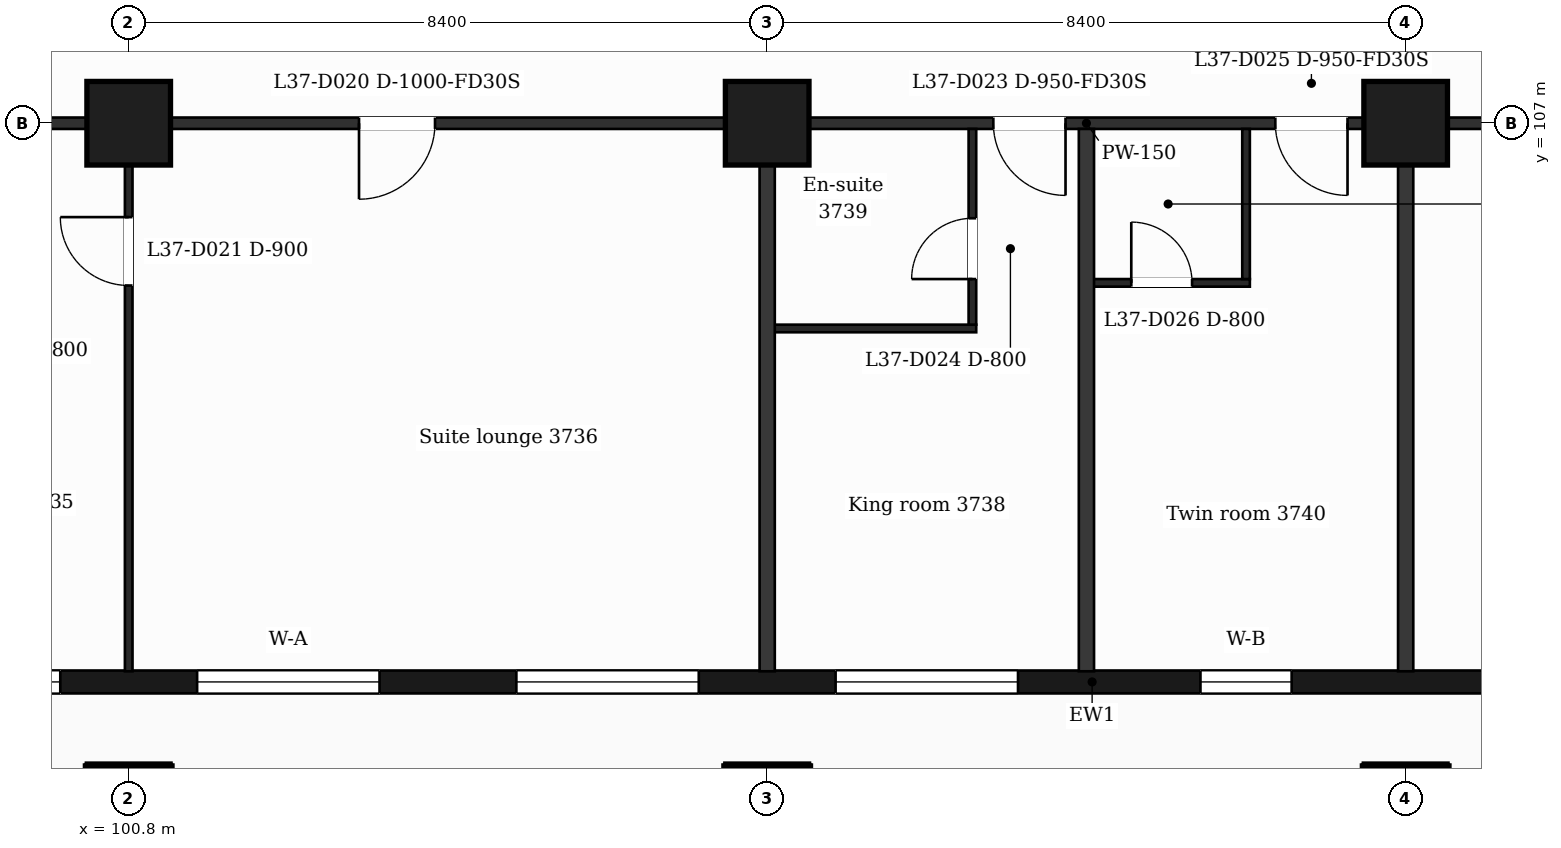
"""IFC4 building model, lengths in metres.
Left out: names, types, materials, properties, quantities, classifications, styles, units other than length and angle.
Written with IfcOpenShell. Run it as: python <this file> out.ifc"""

import sys

from ifc_helpers import new_model, si_unit, direction, frame, frame_2d, origin, origin_2d, place, context, subcontext, project, spatial, rectangle, extrude, element, fill, save


model = new_model("IFC4")
c1 = context("Model", 3, precision=1e-05, world=origin(), true_north=direction((0.0, 1.0)))
c2 = subcontext(c1, "Body", "Model", "MODEL_VIEW")
j1 = project(units=[si_unit("LENGTHUNIT", "METRE"), si_unit("PLANEANGLEUNIT", "RADIAN")], contexts=[c1])
p1 = place(None, origin())
s1 = spatial("IfcSite", under=j1, at=p1, CompositionType="ELEMENT")
p2 = place(p1, origin())
s2 = spatial("IfcBuilding", under=s1, at=p2, CompositionType="ELEMENT")
p3 = place(p2, frame((0.0, 0.0, 158.9)))
s3 = spatial("IfcBuildingStorey", under=s2, at=p3, CompositionType="ELEMENT", Elevation=158.9)
for number, where, z_axis, x_axis in (
    (1, (100.8, 98.0, 0.0), (0.0, 0.0, 1.0), (1.0, 0.0, 0.0)),
    (2, (109.2, 98.0, 0.0), (0.0, 0.0, 1.0), (1.0, 0.0, 0.0)),
    (3, (117.6, 98.0, 0.0), (0.0, 0.0, 1.0), (1.0, 0.0, 0.0)),
    (4, (100.8, 107.0, 0.0), (0.0, 0.0, 1.0), (1.0, 0.0, 0.0)),
    (5, (109.2, 107.0, 0.0), (0.0, 0.0, 1.0), (1.0, 0.0, 0.0)),
    (6, (117.6, 107.0, 0.0), (0.0, 0.0, 1.0), (1.0, 0.0, 0.0)),
):
    element("IfcColumn", number, at=place(p3, frame(where, z_axis=z_axis, x_axis=x_axis)), inside=s3, PredefinedType="COLUMN", context=c2, shape_type="SweptSolid", body=[
        extrude(rectangle(XDim=1.1, YDim=1.1, at=origin_2d()), origin(), (0.0, 0.0, 1.0), 3.7),
    ])
p4 = place(p3, frame((89.85, 99.65, 0.0), z_axis=(0.0, 0.0, 1.0), x_axis=(1.0, 0.0, 0.0)))
e7 = element("IfcWall", 7, at=p4, inside=s3, PredefinedType="SOLIDWALL", context=c2, shape_type="SweptSolid", body=[
    extrude(rectangle(XDim=47.25, YDim=0.3, at=frame_2d((23.625, 0.0))), origin(), (0.0, 0.0, 1.0), 3.38),
])
p5 = place(p4, frame((0.725, 0.0, 0.9)))
e8 = element("IfcOpeningElement", 8, at=p5, cuts=e7, PredefinedType="OPENING", context=c2, shape_type="SweptSolid", body=[
    extrude(rectangle(XDim=1.2, YDim=2.1, at=frame_2d((0.6, 1.05))), frame((0.0, 0.16, 0.0), z_axis=(0.0, -1.0, 0.0), x_axis=(1.0, 0.0, 0.0)), (0.0, 0.0, 1.0), 0.32),
])
p6 = place(p4, frame((3.45, 0.0, 0.9)))
e9 = element("IfcOpeningElement", 9, at=p6, cuts=e7, PredefinedType="OPENING", context=c2, shape_type="SweptSolid", body=[
    extrude(rectangle(XDim=2.4, YDim=2.1, at=frame_2d((1.2, 1.05))), frame((0.0, 0.16, 0.0), z_axis=(0.0, -1.0, 0.0), x_axis=(1.0, 0.0, 0.0)), (0.0, 0.0, 1.0), 0.32),
])
p7 = place(p4, frame((7.65, 0.0, 0.9)))
e10 = element("IfcOpeningElement", 10, at=p7, cuts=e7, PredefinedType="OPENING", context=c2, shape_type="SweptSolid", body=[
    extrude(rectangle(XDim=2.4, YDim=2.1, at=frame_2d((1.2, 1.05))), frame((0.0, 0.16, 0.0), z_axis=(0.0, -1.0, 0.0), x_axis=(1.0, 0.0, 0.0)), (0.0, 0.0, 1.0), 0.32),
])
p8 = place(p4, frame((11.85, 0.0, 0.9)))
e11 = element("IfcOpeningElement", 11, at=p8, cuts=e7, PredefinedType="OPENING", context=c2, shape_type="SweptSolid", body=[
    extrude(rectangle(XDim=2.4, YDim=2.1, at=frame_2d((1.2, 1.05))), frame((0.0, 0.16, 0.0), z_axis=(0.0, -1.0, 0.0), x_axis=(1.0, 0.0, 0.0)), (0.0, 0.0, 1.0), 0.32),
])
p9 = place(p4, frame((16.05, 0.0, 0.9)))
e12 = element("IfcOpeningElement", 12, at=p9, cuts=e7, PredefinedType="OPENING", context=c2, shape_type="SweptSolid", body=[
    extrude(rectangle(XDim=2.4, YDim=2.1, at=frame_2d((1.2, 1.05))), frame((0.0, 0.16, 0.0), z_axis=(0.0, -1.0, 0.0), x_axis=(1.0, 0.0, 0.0)), (0.0, 0.0, 1.0), 0.32),
])
p10 = place(p4, frame((20.25, 0.0, 0.9)))
e13 = element("IfcOpeningElement", 13, at=p10, cuts=e7, PredefinedType="OPENING", context=c2, shape_type="SweptSolid", body=[
    extrude(rectangle(XDim=2.4, YDim=2.1, at=frame_2d((1.2, 1.05))), frame((0.0, 0.16, 0.0), z_axis=(0.0, -1.0, 0.0), x_axis=(1.0, 0.0, 0.0)), (0.0, 0.0, 1.0), 0.32),
])
p11 = place(p4, frame((25.05, 0.0, 0.9)))
e14 = element("IfcOpeningElement", 14, at=p11, cuts=e7, PredefinedType="OPENING", context=c2, shape_type="SweptSolid", body=[
    extrude(rectangle(XDim=1.2, YDim=2.1, at=frame_2d((0.6, 1.05))), frame((0.0, 0.16, 0.0), z_axis=(0.0, -1.0, 0.0), x_axis=(1.0, 0.0, 0.0)), (0.0, 0.0, 1.0), 0.32),
])
p12 = place(p4, frame((29.25, 0.0, 0.9)))
e15 = element("IfcOpeningElement", 15, at=p12, cuts=e7, PredefinedType="OPENING", context=c2, shape_type="SweptSolid", body=[
    extrude(rectangle(XDim=1.2, YDim=2.1, at=frame_2d((0.6, 1.05))), frame((0.0, 0.16, 0.0), z_axis=(0.0, -1.0, 0.0), x_axis=(1.0, 0.0, 0.0)), (0.0, 0.0, 1.0), 0.32),
])
p13 = place(p4, frame((32.55, 0.0, 0.0)))
e16 = element("IfcOpeningElement", 16, at=p13, cuts=e7, PredefinedType="OPENING", context=c2, shape_type="SweptSolid", body=[
    extrude(rectangle(XDim=1.2, YDim=2.4, at=frame_2d((0.6, 1.2))), frame((0.0, 0.16, 0.0), z_axis=(0.0, -1.0, 0.0), x_axis=(1.0, 0.0, 0.0)), (0.0, 0.0, 1.0), 0.32),
])
p14 = place(p4, frame((34.35, 0.0, 0.9)))
e17 = element("IfcOpeningElement", 17, at=p14, cuts=e7, PredefinedType="OPENING", context=c2, shape_type="SweptSolid", body=[
    extrude(rectangle(XDim=1.2, YDim=2.1, at=frame_2d((0.6, 1.05))), frame((0.0, 0.16, 0.0), z_axis=(0.0, -1.0, 0.0), x_axis=(1.0, 0.0, 0.0)), (0.0, 0.0, 1.0), 0.32),
])
p15 = place(p4, frame((37.05, 0.0, 0.9)))
e18 = element("IfcOpeningElement", 18, at=p15, cuts=e7, PredefinedType="OPENING", context=c2, shape_type="SweptSolid", body=[
    extrude(rectangle(XDim=2.4, YDim=2.1, at=frame_2d((1.2, 1.05))), frame((0.0, 0.16, 0.0), z_axis=(0.0, -1.0, 0.0), x_axis=(1.0, 0.0, 0.0)), (0.0, 0.0, 1.0), 0.32),
])
p16 = place(p4, frame((40.95, 0.0, 0.0)))
e19 = element("IfcOpeningElement", 19, at=p16, cuts=e7, PredefinedType="OPENING", context=c2, shape_type="SweptSolid", body=[
    extrude(rectangle(XDim=1.2, YDim=2.4, at=frame_2d((0.6, 1.2))), frame((0.0, 0.16, 0.0), z_axis=(0.0, -1.0, 0.0), x_axis=(1.0, 0.0, 0.0)), (0.0, 0.0, 1.0), 0.32),
])
p17 = place(p4, frame((42.75, 0.0, 0.9)))
e20 = element("IfcOpeningElement", 20, at=p17, cuts=e7, PredefinedType="OPENING", context=c2, shape_type="SweptSolid", body=[
    extrude(rectangle(XDim=1.2, YDim=2.1, at=frame_2d((0.6, 1.05))), frame((0.0, 0.16, 0.0), z_axis=(0.0, -1.0, 0.0), x_axis=(1.0, 0.0, 0.0)), (0.0, 0.0, 1.0), 0.32),
])
p18 = place(p4, frame((45.25, 0.0, 0.9)))
e21 = element("IfcOpeningElement", 21, at=p18, cuts=e7, PredefinedType="OPENING", context=c2, shape_type="SweptSolid", body=[
    extrude(rectangle(XDim=1.2, YDim=2.1, at=frame_2d((0.6, 1.05))), frame((0.0, 0.16, 0.0), z_axis=(0.0, -1.0, 0.0), x_axis=(1.0, 0.0, 0.0)), (0.0, 0.0, 1.0), 0.32),
])
p19 = place(p3, frame((109.2, 104.3, 0.0), z_axis=(0.0, 0.0, 1.0), x_axis=(1.0, 0.0, 0.0)))
e22 = element("IfcWall", 22, at=p19, inside=s3, PredefinedType="PARTITIONING", context=c2, shape_type="SweptSolid", body=[
    extrude(rectangle(XDim=2.75, YDim=0.1, at=frame_2d((1.375, 0.0))), origin(), (0.0, 0.0, 1.0), 3.38),
])
p20 = place(p3, frame((113.4, 104.9, 0.0), z_axis=(0.0, 0.0, 1.0), x_axis=(1.0, 0.0, 0.0)))
e23 = element("IfcWall", 23, at=p20, inside=s3, PredefinedType="PARTITIONING", context=c2, shape_type="SweptSolid", body=[
    extrude(rectangle(XDim=2.15, YDim=0.1, at=frame_2d((1.075, 0.0))), origin(), (0.0, 0.0, 1.0), 3.38),
])
p21 = place(p20, frame((0.59, 0.0, 0.0)))
e24 = element("IfcOpeningElement", 24, at=p21, cuts=e23, PredefinedType="OPENING", context=c2, shape_type="SweptSolid", body=[
    extrude(rectangle(XDim=0.8, YDim=2.1, at=frame_2d((0.4, 1.05))), frame((0.0, 0.06, 0.0), z_axis=(0.0, -1.0, 0.0), x_axis=(1.0, 0.0, 0.0)), (0.0, 0.0, 1.0), 0.12),
])
p22 = place(p3, frame((87.018, 107.0, 0.0), z_axis=(0.0, 0.0, 1.0), x_axis=(1.0, 0.0, 0.0)))
e25 = element("IfcWall", 25, at=p22, inside=s3, PredefinedType="PARTITIONING", context=c2, shape_type="SweptSolid", body=[
    extrude(rectangle(XDim=52.765, YDim=0.15, at=frame_2d((26.382, 0.0))), origin(), (0.0, 0.0, 1.0), 3.38),
])
p23 = place(p22, frame((1.032, 0.0, 0.0)))
e26 = element("IfcOpeningElement", 26, at=p23, cuts=e25, PredefinedType="OPENING", context=c2, shape_type="SweptSolid", body=[
    extrude(rectangle(XDim=0.95, YDim=2.1, at=frame_2d((0.475, 1.05))), frame((0.0, 0.085, 0.0), z_axis=(0.0, -1.0, 0.0), x_axis=(1.0, 0.0, 0.0)), (0.0, 0.0, 1.0), 0.17),
])
p24 = place(p22, frame((6.369, 0.0, 0.0)))
e27 = element("IfcOpeningElement", 27, at=p24, cuts=e25, PredefinedType="OPENING", context=c2, shape_type="SweptSolid", body=[
    extrude(rectangle(XDim=0.95, YDim=2.1, at=frame_2d((0.475, 1.05))), frame((0.0, 0.085, 0.0), z_axis=(0.0, -1.0, 0.0), x_axis=(1.0, 0.0, 0.0)), (0.0, 0.0, 1.0), 0.17),
])
p25 = place(p22, frame((16.812, 0.0, 0.0)))
e28 = element("IfcOpeningElement", 28, at=p25, cuts=e25, PredefinedType="OPENING", context=c2, shape_type="SweptSolid", body=[
    extrude(rectangle(XDim=1.0, YDim=2.1, at=frame_2d((0.5, 1.05))), frame((0.0, 0.085, 0.0), z_axis=(0.0, -1.0, 0.0), x_axis=(1.0, 0.0, 0.0)), (0.0, 0.0, 1.0), 0.17),
])
p26 = place(p22, frame((25.157, 0.0, 0.0)))
e29 = element("IfcOpeningElement", 29, at=p26, cuts=e25, PredefinedType="OPENING", context=c2, shape_type="SweptSolid", body=[
    extrude(rectangle(XDim=0.95, YDim=2.1, at=frame_2d((0.475, 1.05))), frame((0.0, 0.085, 0.0), z_axis=(0.0, -1.0, 0.0), x_axis=(1.0, 0.0, 0.0)), (0.0, 0.0, 1.0), 0.17),
])
p27 = place(p22, frame((28.867, 0.0, 0.0)))
e30 = element("IfcOpeningElement", 30, at=p27, cuts=e25, PredefinedType="OPENING", context=c2, shape_type="SweptSolid", body=[
    extrude(rectangle(XDim=0.95, YDim=2.1, at=frame_2d((0.475, 1.05))), frame((0.0, 0.085, 0.0), z_axis=(0.0, -1.0, 0.0), x_axis=(1.0, 0.0, 0.0)), (0.0, 0.0, 1.0), 0.17),
])
p28 = place(p22, frame((34.952, 0.0, 0.0)))
e31 = element("IfcOpeningElement", 31, at=p28, cuts=e25, PredefinedType="OPENING", context=c2, shape_type="SweptSolid", body=[
    extrude(rectangle(XDim=1.0, YDim=2.1, at=frame_2d((0.5, 1.05))), frame((0.0, 0.085, 0.0), z_axis=(0.0, -1.0, 0.0), x_axis=(1.0, 0.0, 0.0)), (0.0, 0.0, 1.0), 0.17),
])
p29 = place(p22, frame((45.632, 0.0, 0.0)))
e32 = element("IfcOpeningElement", 32, at=p29, cuts=e25, PredefinedType="OPENING", context=c2, shape_type="SweptSolid", body=[
    extrude(rectangle(XDim=0.95, YDim=2.1, at=frame_2d((0.475, 1.05))), frame((0.0, 0.085, 0.0), z_axis=(0.0, -1.0, 0.0), x_axis=(1.0, 0.0, 0.0)), (0.0, 0.0, 1.0), 0.17),
])
p30 = place(p22, frame((48.56, 0.0, 0.0)))
e33 = element("IfcOpeningElement", 33, at=p30, cuts=e25, PredefinedType="OPENING", context=c2, shape_type="SweptSolid", body=[
    extrude(rectangle(XDim=0.95, YDim=2.1, at=frame_2d((0.475, 1.05))), frame((0.0, 0.085, 0.0), z_axis=(0.0, -1.0, 0.0), x_axis=(1.0, 0.0, 0.0)), (0.0, 0.0, 1.0), 0.17),
])
p31 = place(p3, frame((100.8, 99.79, 0.0), z_axis=(0.0, 0.0, 1.0), x_axis=(0.0, 1.0, 0.0)))
e34 = element("IfcWall", 34, at=p31, inside=s3, PredefinedType="PARTITIONING", context=c2, shape_type="SweptSolid", body=[
    extrude(rectangle(XDim=7.135, YDim=0.1, at=frame_2d((3.567, 0.0))), origin(), (0.0, 0.0, 1.0), 3.38),
])
p32 = place(p31, frame((5.075, 0.0, 0.0)))
e35 = element("IfcOpeningElement", 35, at=p32, cuts=e34, PredefinedType="OPENING", context=c2, shape_type="SweptSolid", body=[
    extrude(rectangle(XDim=0.9, YDim=2.1, at=frame_2d((0.45, 1.05))), frame((0.0, 0.06, 0.0), z_axis=(0.0, -1.0, 0.0), x_axis=(1.0, 0.0, 0.0)), (0.0, 0.0, 1.0), 0.12),
])
p33 = place(p3, frame((109.2, 99.79, 0.0), z_axis=(0.0, 0.0, 1.0), x_axis=(0.0, 1.0, 0.0)))
e36 = element("IfcWall", 36, at=p33, inside=s3, PredefinedType="PARTITIONING", context=c2, shape_type="SweptSolid", body=[
    extrude(rectangle(XDim=7.135, YDim=0.2, at=frame_2d((3.567, 0.0))), origin(), (0.0, 0.0, 1.0), 3.38),
])
p34 = place(p3, frame((111.9, 104.35, 0.0), z_axis=(0.0, 0.0, 1.0), x_axis=(0.0, 1.0, 0.0)))
e37 = element("IfcWall", 37, at=p34, inside=s3, PredefinedType="PARTITIONING", context=c2, shape_type="SweptSolid", body=[
    extrude(rectangle(XDim=2.575, YDim=0.1, at=frame_2d((1.288, 0.0))), origin(), (0.0, 0.0, 1.0), 3.38),
])
p35 = place(p34, frame((0.6, 0.0, 0.0)))
e38 = element("IfcOpeningElement", 38, at=p35, cuts=e37, PredefinedType="OPENING", context=c2, shape_type="SweptSolid", body=[
    extrude(rectangle(XDim=0.8, YDim=2.1, at=frame_2d((0.4, 1.05))), frame((0.0, 0.06, 0.0), z_axis=(0.0, -1.0, 0.0), x_axis=(1.0, 0.0, 0.0)), (0.0, 0.0, 1.0), 0.12),
])
p36 = place(p3, frame((113.4, 99.79, 0.0), z_axis=(0.0, 0.0, 1.0), x_axis=(0.0, 1.0, 0.0)))
e39 = element("IfcWall", 39, at=p36, inside=s3, PredefinedType="PARTITIONING", context=c2, shape_type="SweptSolid", body=[
    extrude(rectangle(XDim=7.135, YDim=0.2, at=frame_2d((3.567, 0.0))), origin(), (0.0, 0.0, 1.0), 3.38),
])
p37 = place(p3, frame((115.5, 104.95, 0.0), z_axis=(0.0, 0.0, 1.0), x_axis=(0.0, 1.0, 0.0)))
e40 = element("IfcWall", 40, at=p37, inside=s3, PredefinedType="PARTITIONING", context=c2, shape_type="SweptSolid", body=[
    extrude(rectangle(XDim=1.975, YDim=0.1, at=frame_2d((0.988, 0.0))), origin(), (0.0, 0.0, 1.0), 3.38),
])
p38 = place(p3, frame((117.6, 99.79, 0.0), z_axis=(0.0, 0.0, 1.0), x_axis=(0.0, 1.0, 0.0)))
e41 = element("IfcWall", 41, at=p38, inside=s3, PredefinedType="PARTITIONING", context=c2, shape_type="SweptSolid", body=[
    extrude(rectangle(XDim=7.135, YDim=0.2, at=frame_2d((3.567, 0.0))), origin(), (0.0, 0.0, 1.0), 3.38),
])
p39 = place(p7, origin())
e42 = element("IfcWindow", 42, at=p39, inside=s3, PartitioningType="SINGLE_PANEL", PredefinedType="WINDOW", context=c2, shape_type="SweptSolid", body=[
    extrude(rectangle(XDim=2.4, YDim=2.1, at=frame_2d((1.2, 1.05))), frame((0.0, 0.03, 0.0), z_axis=(0.0, -1.0, 0.0), x_axis=(1.0, 0.0, 0.0)), (0.0, 0.0, 1.0), 0.06),
])
fill(e10, e42)
p40 = place(p8, origin())
e43 = element("IfcWindow", 43, at=p40, inside=s3, PartitioningType="SINGLE_PANEL", PredefinedType="WINDOW", context=c2, shape_type="SweptSolid", body=[
    extrude(rectangle(XDim=2.4, YDim=2.1, at=frame_2d((1.2, 1.05))), frame((0.0, 0.03, 0.0), z_axis=(0.0, -1.0, 0.0), x_axis=(1.0, 0.0, 0.0)), (0.0, 0.0, 1.0), 0.06),
])
fill(e11, e43)
p41 = place(p9, origin())
e44 = element("IfcWindow", 44, at=p41, inside=s3, PartitioningType="SINGLE_PANEL", PredefinedType="WINDOW", context=c2, shape_type="SweptSolid", body=[
    extrude(rectangle(XDim=2.4, YDim=2.1, at=frame_2d((1.2, 1.05))), frame((0.0, 0.03, 0.0), z_axis=(0.0, -1.0, 0.0), x_axis=(1.0, 0.0, 0.0)), (0.0, 0.0, 1.0), 0.06),
])
fill(e12, e44)
p42 = place(p10, origin())
e45 = element("IfcWindow", 45, at=p42, inside=s3, PartitioningType="SINGLE_PANEL", PredefinedType="WINDOW", context=c2, shape_type="SweptSolid", body=[
    extrude(rectangle(XDim=2.4, YDim=2.1, at=frame_2d((1.2, 1.05))), frame((0.0, 0.03, 0.0), z_axis=(0.0, -1.0, 0.0), x_axis=(1.0, 0.0, 0.0)), (0.0, 0.0, 1.0), 0.06),
])
fill(e13, e45)
p43 = place(p11, origin())
e46 = element("IfcWindow", 46, at=p43, inside=s3, PartitioningType="SINGLE_PANEL", PredefinedType="WINDOW", context=c2, shape_type="SweptSolid", body=[
    extrude(rectangle(XDim=1.2, YDim=2.1, at=frame_2d((0.6, 1.05))), frame((0.0, 0.03, 0.0), z_axis=(0.0, -1.0, 0.0), x_axis=(1.0, 0.0, 0.0)), (0.0, 0.0, 1.0), 0.06),
])
fill(e14, e46)
p44 = place(p25, origin())
e47 = element("IfcDoor", 47, at=p44, inside=s3, OperationType="SINGLE_SWING_LEFT", PredefinedType="DOOR", context=c2, shape_type="SweptSolid", body=[
    extrude(rectangle(XDim=1.0, YDim=2.1, at=frame_2d((0.5, 1.05))), frame((0.0, 0.025, 0.0), z_axis=(0.0, -1.0, 0.0), x_axis=(1.0, 0.0, 0.0)), (0.0, 0.0, 1.0), 0.05),
])
fill(e28, e47)
p45 = place(p32, origin())
e48 = element("IfcDoor", 48, at=p45, inside=s3, OperationType="SINGLE_SWING_RIGHT", PredefinedType="DOOR", context=c2, shape_type="SweptSolid", body=[
    extrude(rectangle(XDim=0.9, YDim=2.1, at=frame_2d((0.45, 1.05))), frame((0.0, 0.025, 0.0), z_axis=(0.0, -1.0, 0.0), x_axis=(1.0, 0.0, 0.0)), (0.0, 0.0, 1.0), 0.05),
])
fill(e35, e48)
p46 = place(p26, origin())
e49 = element("IfcDoor", 49, at=p46, inside=s3, OperationType="SINGLE_SWING_RIGHT", PredefinedType="DOOR", context=c2, shape_type="SweptSolid", body=[
    extrude(rectangle(XDim=0.95, YDim=2.1, at=frame_2d((0.475, 1.05))), frame((0.0, 0.025, 0.0), z_axis=(0.0, -1.0, 0.0), x_axis=(1.0, 0.0, 0.0)), (0.0, 0.0, 1.0), 0.05),
])
fill(e29, e49)
p47 = place(p35, origin())
e50 = element("IfcDoor", 50, at=p47, inside=s3, OperationType="SINGLE_SWING_LEFT", PredefinedType="DOOR", context=c2, shape_type="SweptSolid", body=[
    extrude(rectangle(XDim=0.8, YDim=2.1, at=frame_2d((0.4, 1.05))), frame((0.0, 0.025, 0.0), z_axis=(0.0, -1.0, 0.0), x_axis=(1.0, 0.0, 0.0)), (0.0, 0.0, 1.0), 0.05),
])
fill(e38, e50)
p48 = place(p27, origin())
e51 = element("IfcDoor", 51, at=p48, inside=s3, OperationType="SINGLE_SWING_RIGHT", PredefinedType="DOOR", context=c2, shape_type="SweptSolid", body=[
    extrude(rectangle(XDim=0.95, YDim=2.1, at=frame_2d((0.475, 1.05))), frame((0.0, 0.025, 0.0), z_axis=(0.0, -1.0, 0.0), x_axis=(1.0, 0.0, 0.0)), (0.0, 0.0, 1.0), 0.05),
])
fill(e30, e51)
p49 = place(p21, origin())
e52 = element("IfcDoor", 52, at=p49, inside=s3, OperationType="SINGLE_SWING_LEFT", PredefinedType="DOOR", context=c2, shape_type="SweptSolid", body=[
    extrude(rectangle(XDim=0.8, YDim=2.1, at=frame_2d((0.4, 1.05))), frame((0.0, 0.025, 0.0), z_axis=(0.0, -1.0, 0.0), x_axis=(1.0, 0.0, 0.0)), (0.0, 0.0, 1.0), 0.05),
])
fill(e24, e52)
save(model, sys.argv[1])
